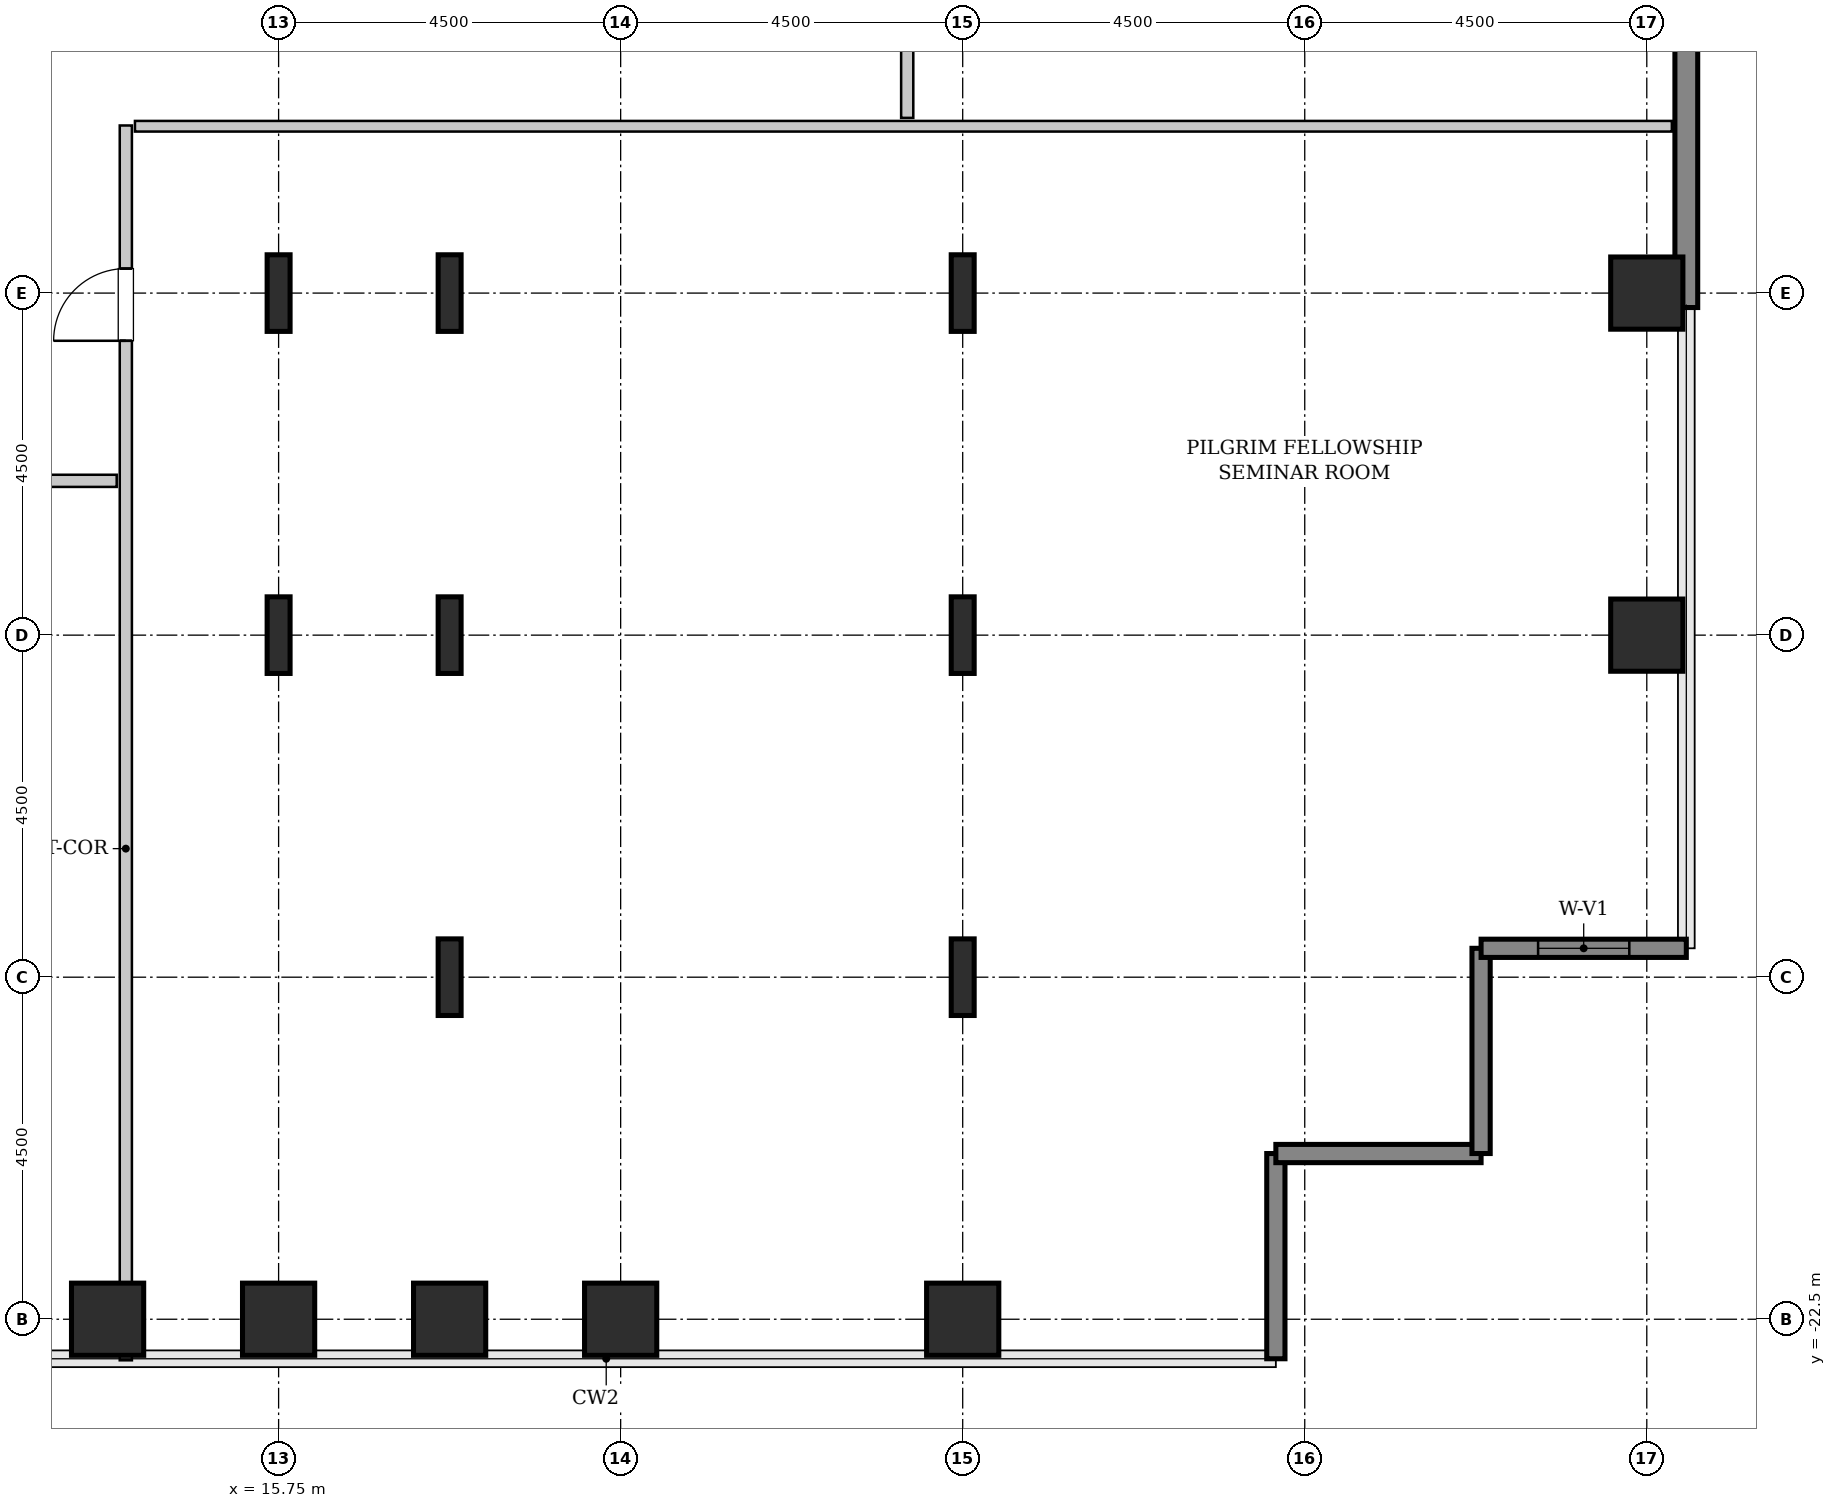
"""IFC4 building model, lengths in metres.
Left out: names, types, materials, properties, quantities, classifications, styles, units other than length and angle.
Written with IfcOpenShell. Run it as: python <this file> out.ifc"""

import sys

from ifc_helpers import new_model, si_unit, direction, frame, frame_2d, origin, origin_2d, place, context, subcontext, project, spatial, rectangle, hollow_rectangle, i_section, extrude, source, transform, mapped, element, fill, save


model = new_model("IFC4")
c1 = context("Model", 3, precision=1e-05, world=origin(), true_north=direction((0.0, 1.0)))
c2 = subcontext(c1, "Body", "Model", "MODEL_VIEW")
j1 = project(units=[si_unit("LENGTHUNIT", "METRE"), si_unit("PLANEANGLEUNIT", "RADIAN")], contexts=[c1])
p1 = place(None, origin())
s1 = spatial("IfcSite", under=j1, at=p1, CompositionType="ELEMENT")
p2 = place(p1, origin())
s2 = spatial("IfcBuilding", under=s1, at=p2, CompositionType="ELEMENT")
p3 = place(p2, frame((0.0, 0.0, 90.8)))
s3 = spatial("IfcBuildingStorey", under=s2, at=p3, CompositionType="ELEMENT", Elevation=90.8)
m1 = source(origin(), c2, "Body", "SweptSolid", [
    extrude(hollow_rectangle(XDim=0.95, YDim=0.95, WallThickness=0.045, InnerFilletRadius=0.045, OuterFilletRadius=0.09, at=origin_2d()), origin(), (0.0, 0.0, 1.0), 3.8),
])
for number, where, z_axis, x_axis in (
    (1, (13.5, -22.5, 0.0), (0.0, 0.0, 1.0), (1.0, 0.0, 0.0)),
    (2, (15.75, -22.5, 0.0), (0.0, 0.0, 1.0), (1.0, 0.0, 0.0)),
):
    element("IfcColumn", number, at=place(p3, frame(where, z_axis=z_axis, x_axis=x_axis)), inside=s3, PredefinedType="COLUMN", context=c2, shape_type="MappedRepresentation", body=[
        mapped(m1, transform((0.0, 0.0, 0.0), x_axis=(1.0, 0.0, 0.0), y_axis=(0.0, 1.0, 0.0), z_axis=(0.0, 0.0, 1.0), scale=1.0)),
    ])
m2 = source(origin(), c2, "Body", "SweptSolid", [
    extrude(i_section(OverallWidth=0.302, OverallDepth=1.008, WebThickness=0.021, FlangeThickness=0.04, FilletRadius=0.03, at=origin_2d()), origin(), (0.0, 0.0, 1.0), 3.8),
])
for number, where, z_axis, x_axis in (
    (3, (15.75, -13.5, 0.0), (0.0, 0.0, 1.0), (1.0, 0.0, 0.0)),
    (4, (15.75, -9.0, 0.0), (0.0, 0.0, 1.0), (1.0, 0.0, 0.0)),
):
    element("IfcColumn", number, at=place(p3, frame(where, z_axis=z_axis, x_axis=x_axis)), inside=s3, PredefinedType="COLUMN", context=c2, shape_type="MappedRepresentation", body=[
        mapped(m2, transform((0.0, 0.0, 0.0), x_axis=(1.0, 0.0, 0.0), y_axis=(0.0, 1.0, 0.0), z_axis=(0.0, 0.0, 1.0), scale=1.0)),
    ])
p4 = place(p3, frame((18.0, -22.5, 0.0), z_axis=(0.0, 0.0, 1.0), x_axis=(1.0, 0.0, 0.0)))
e5 = element("IfcColumn", 5, at=p4, inside=s3, PredefinedType="COLUMN", context=c2, shape_type="MappedRepresentation", body=[
    mapped(m1, transform((0.0, 0.0, 0.0), x_axis=(1.0, 0.0, 0.0), y_axis=(0.0, 1.0, 0.0), z_axis=(0.0, 0.0, 1.0), scale=1.0)),
])
for number, where, z_axis, x_axis in (
    (6, (18.0, -18.0, 0.0), (0.0, 0.0, 1.0), (1.0, 0.0, 0.0)),
    (7, (18.0, -13.5, 0.0), (0.0, 0.0, 1.0), (1.0, 0.0, 0.0)),
    (8, (18.0, -9.0, 0.0), (0.0, 0.0, 1.0), (1.0, 0.0, 0.0)),
):
    element("IfcColumn", number, at=place(p3, frame(where, z_axis=z_axis, x_axis=x_axis)), inside=s3, PredefinedType="COLUMN", context=c2, shape_type="MappedRepresentation", body=[
        mapped(m2, transform((0.0, 0.0, 0.0), x_axis=(1.0, 0.0, 0.0), y_axis=(0.0, 1.0, 0.0), z_axis=(0.0, 0.0, 1.0), scale=1.0)),
    ])
for number, where, z_axis, x_axis in (
    (9, (20.25, -22.5, 0.0), (0.0, 0.0, 1.0), (1.0, 0.0, 0.0)),
    (10, (24.75, -22.5, 0.0), (0.0, 0.0, 1.0), (1.0, 0.0, 0.0)),
):
    element("IfcColumn", number, at=place(p3, frame(where, z_axis=z_axis, x_axis=x_axis)), inside=s3, PredefinedType="COLUMN", context=c2, shape_type="MappedRepresentation", body=[
        mapped(m1, transform((0.0, 0.0, 0.0), x_axis=(1.0, 0.0, 0.0), y_axis=(0.0, 1.0, 0.0), z_axis=(0.0, 0.0, 1.0), scale=1.0)),
    ])
for number, where, z_axis, x_axis in (
    (11, (24.75, -18.0, 0.0), (0.0, 0.0, 1.0), (1.0, 0.0, 0.0)),
    (12, (24.75, -13.5, 0.0), (0.0, 0.0, 1.0), (1.0, 0.0, 0.0)),
    (13, (24.75, -9.0, 0.0), (0.0, 0.0, 1.0), (1.0, 0.0, 0.0)),
):
    element("IfcColumn", number, at=place(p3, frame(where, z_axis=z_axis, x_axis=x_axis)), inside=s3, PredefinedType="COLUMN", context=c2, shape_type="MappedRepresentation", body=[
        mapped(m2, transform((0.0, 0.0, 0.0), x_axis=(1.0, 0.0, 0.0), y_axis=(0.0, 1.0, 0.0), z_axis=(0.0, 0.0, 1.0), scale=1.0)),
    ])
for number, where, z_axis, x_axis in (
    (14, (33.75, -13.5, 0.0), (0.0, 0.0, 1.0), (1.0, 0.0, 0.0)),
    (15, (33.75, -9.0, 0.0), (0.0, 0.0, 1.0), (1.0, 0.0, 0.0)),
):
    element("IfcColumn", number, at=place(p3, frame(where, z_axis=z_axis, x_axis=x_axis)), inside=s3, PredefinedType="COLUMN", context=c2, shape_type="MappedRepresentation", body=[
        mapped(m1, transform((0.0, 0.0, 0.0), x_axis=(1.0, 0.0, 0.0), y_axis=(0.0, 1.0, 0.0), z_axis=(0.0, 0.0, 1.0), scale=1.0)),
    ])
m3 = source(origin(), c2, "Body", "SweptSolid", [
    extrude(rectangle(XDim=4.88, YDim=0.3, at=frame_2d((2.44, 0.0))), origin(), (0.0, 0.0, 1.0), 3.55),
])
p5 = place(p3, frame((34.27, -9.19, 0.0), z_axis=(0.0, 0.0, 1.0), x_axis=(0.0, 1.0, 0.0)))
e16 = element("IfcWall", 16, at=p5, inside=s3, PredefinedType="SHEAR", context=c2, shape_type="MappedRepresentation", body=[
    mapped(m3, transform((0.0, 0.0, 0.0), x_axis=(1.0, 0.0, 0.0), y_axis=(0.0, 1.0, 0.0), z_axis=(0.0, 0.0, 1.0), scale=1.0)),
])
m4 = source(origin(), c2, "Body", "SweptSolid", [
    extrude(rectangle(XDim=2.7, YDim=0.24, at=frame_2d((1.35, 0.0))), origin(), (0.0, 0.0, 1.0), 3.55),
])
for number, where, z_axis, x_axis in (
    (17, (28.87, -23.02, 0.0), (0.0, 0.0, 1.0), (0.0, 1.0, 0.0)),
    (18, (28.87, -20.32, 0.0), (0.0, 0.0, 1.0), (1.0, 0.0, 0.0)),
    (19, (31.57, -20.32, 0.0), (0.0, 0.0, 1.0), (0.0, 1.0, 0.0)),
):
    element("IfcWall", number, at=place(p3, frame(where, z_axis=z_axis, x_axis=x_axis)), inside=s3, PredefinedType="SHEAR", context=c2, shape_type="MappedRepresentation", body=[
        mapped(m4, transform((0.0, 0.0, 0.0), x_axis=(1.0, 0.0, 0.0), y_axis=(0.0, 1.0, 0.0), z_axis=(0.0, 0.0, 1.0), scale=1.0)),
    ])
p6 = place(p3, frame((31.57, -17.62, 0.0), z_axis=(0.0, 0.0, 1.0), x_axis=(1.0, 0.0, 0.0)))
e20 = element("IfcWall", 20, at=p6, inside=s3, PredefinedType="SHEAR", context=c2, shape_type="MappedRepresentation", body=[
    mapped(m4, transform((0.0, 0.0, 0.0), x_axis=(1.0, 0.0, 0.0), y_axis=(0.0, 1.0, 0.0), z_axis=(0.0, 0.0, 1.0), scale=1.0)),
])
p7 = place(p6, frame((0.75, 0.0, 0.85)))
e21 = element("IfcOpeningElement", 21, at=p7, cuts=e20, PredefinedType="OPENING", context=c2, shape_type="SweptSolid", body=[
    extrude(rectangle(XDim=1.2, YDim=1.8, at=frame_2d((0.6, 0.9))), frame((0.0, 0.13, 0.0), z_axis=(0.0, -1.0, 0.0), x_axis=(1.0, 0.0, 0.0)), (0.0, 0.0, 1.0), 0.26),
])
m5 = source(origin(), c2, "Body", "SweptSolid", [
    extrude(rectangle(XDim=16.245, YDim=0.16, at=frame_2d((8.123, 0.0))), origin(), (0.0, 0.0, 1.0), 3.535),
])
p8 = place(p3, frame((13.74, -23.04, 0.0), z_axis=(0.0, 0.0, 1.0), x_axis=(0.0, 1.0, 0.0)))
e22 = element("IfcWall", 22, at=p8, inside=s3, PredefinedType="PARTITIONING", context=c2, shape_type="MappedRepresentation", body=[
    mapped(m5, transform((0.0, 0.0, 0.0), x_axis=(1.0, 0.0, 0.0), y_axis=(0.0, 1.0, 0.0), z_axis=(0.0, 0.0, 1.0), scale=1.0)),
])
p9 = place(p8, frame((13.413, 0.0, 0.0)))
e23 = element("IfcOpeningElement", 23, at=p9, cuts=e22, PredefinedType="OPENING", context=c2, shape_type="SweptSolid", body=[
    extrude(rectangle(XDim=0.95, YDim=2.1, at=frame_2d((0.475, 1.05))), frame((0.0, 0.09, 0.0), z_axis=(0.0, -1.0, 0.0), x_axis=(1.0, 0.0, 0.0)), (0.0, 0.0, 1.0), 0.18),
])
m6 = source(origin(), c2, "Body", "SweptSolid", [
    extrude(rectangle(XDim=20.22, YDim=0.14, at=frame_2d((10.11, 0.0))), origin(), (0.0, 0.0, 1.0), 3.535),
])
p10 = place(p3, frame((13.86, -6.805, 0.0), z_axis=(0.0, 0.0, 1.0), x_axis=(1.0, 0.0, 0.0)))
e24 = element("IfcWall", 24, at=p10, inside=s3, PredefinedType="PARTITIONING", context=c2, shape_type="MappedRepresentation", body=[
    mapped(m6, transform((0.0, 0.0, 0.0), x_axis=(1.0, 0.0, 0.0), y_axis=(0.0, 1.0, 0.0), z_axis=(0.0, 0.0, 1.0), scale=1.0)),
])
m7 = source(origin(), c2, "Body", "SweptSolid", [
    extrude(rectangle(XDim=13.5, YDim=0.16, at=frame_2d((6.75, 0.0))), origin(), (0.0, 0.0, 1.0), 3.535),
])
p11 = place(p3, frame((24.02, -6.695, 0.0), z_axis=(0.0, 0.0, 1.0), x_axis=(0.0, 1.0, 0.0)))
e25 = element("IfcWall", 25, at=p11, inside=s3, PredefinedType="PARTITIONING", context=c2, shape_type="MappedRepresentation", body=[
    mapped(m7, transform((0.0, 0.0, 0.0), x_axis=(1.0, 0.0, 0.0), y_axis=(0.0, 1.0, 0.0), z_axis=(0.0, 0.0, 1.0), scale=1.0)),
])
p12 = place(p11, frame((3.97, 0.0, 0.0)))
e26 = element("IfcOpeningElement", 26, at=p12, cuts=e25, PredefinedType="OPENING", context=c2, shape_type="SweptSolid", body=[
    extrude(rectangle(XDim=0.95, YDim=2.1, at=frame_2d((0.475, 1.05))), frame((0.0, 0.09, 0.0), z_axis=(0.0, -1.0, 0.0), x_axis=(1.0, 0.0, 0.0)), (0.0, 0.0, 1.0), 0.18),
])
m8 = source(origin(), c2, "Body", "SweptSolid", [
    extrude(rectangle(XDim=6.225, YDim=0.16, at=frame_2d((3.113, 0.0))), origin(), (0.0, 0.0, 1.0), 3.535),
])
p13 = place(p3, frame((7.395, -11.47, 0.0), z_axis=(0.0, 0.0, 1.0), x_axis=(1.0, 0.0, 0.0)))
e27 = element("IfcWall", 27, at=p13, inside=s3, PredefinedType="PARTITIONING", context=c2, shape_type="MappedRepresentation", body=[
    mapped(m8, transform((0.0, 0.0, 0.0), x_axis=(1.0, 0.0, 0.0), y_axis=(0.0, 1.0, 0.0), z_axis=(0.0, 0.0, 1.0), scale=1.0)),
])
p14 = place(p13, frame((2.637, 0.0, 0.0)))
e28 = element("IfcOpeningElement", 28, at=p14, cuts=e27, PredefinedType="OPENING", context=c2, shape_type="SweptSolid", body=[
    extrude(rectangle(XDim=0.95, YDim=2.1, at=frame_2d((0.475, 1.05))), frame((0.0, 0.09, 0.0), z_axis=(0.0, -1.0, 0.0), x_axis=(1.0, 0.0, 0.0)), (0.0, 0.0, 1.0), 0.18),
])
m9 = source(origin(), c2, "Body", "SweptSolid", [
    extrude(rectangle(XDim=1.2, YDim=1.8, at=frame_2d((0.6, 0.9))), frame((0.0, 0.03, 0.0), z_axis=(0.0, -1.0, 0.0), x_axis=(1.0, 0.0, 0.0)), (0.0, 0.0, 1.0), 0.06),
])
p15 = place(p7, origin())
e29 = element("IfcWindow", 29, at=p15, inside=s3, PartitioningType="SINGLE_PANEL", PredefinedType="WINDOW", context=c2, shape_type="MappedRepresentation", body=[
    mapped(m9, transform((0.0, 0.0, 0.0), x_axis=(1.0, 0.0, 0.0), y_axis=(0.0, 1.0, 0.0), z_axis=(0.0, 0.0, 1.0), scale=1.0)),
])
fill(e21, e29)
m10 = source(origin(), c2, "Body", "SweptSolid", [
    extrude(rectangle(XDim=0.95, YDim=2.1, at=frame_2d((0.475, 1.05))), frame((0.0, 0.025, 0.0), z_axis=(0.0, -1.0, 0.0), x_axis=(1.0, 0.0, 0.0)), (0.0, 0.0, 1.0), 0.05),
])
p16 = place(p9, origin())
e30 = element("IfcDoor", 30, at=p16, inside=s3, OperationType="SINGLE_SWING_LEFT", PredefinedType="DOOR", context=c2, shape_type="MappedRepresentation", body=[
    mapped(m10, transform((0.0, 0.0, 0.0), x_axis=(1.0, 0.0, 0.0), y_axis=(0.0, 1.0, 0.0), z_axis=(0.0, 0.0, 1.0), scale=1.0)),
])
fill(e23, e30)
save(model, sys.argv[1])
